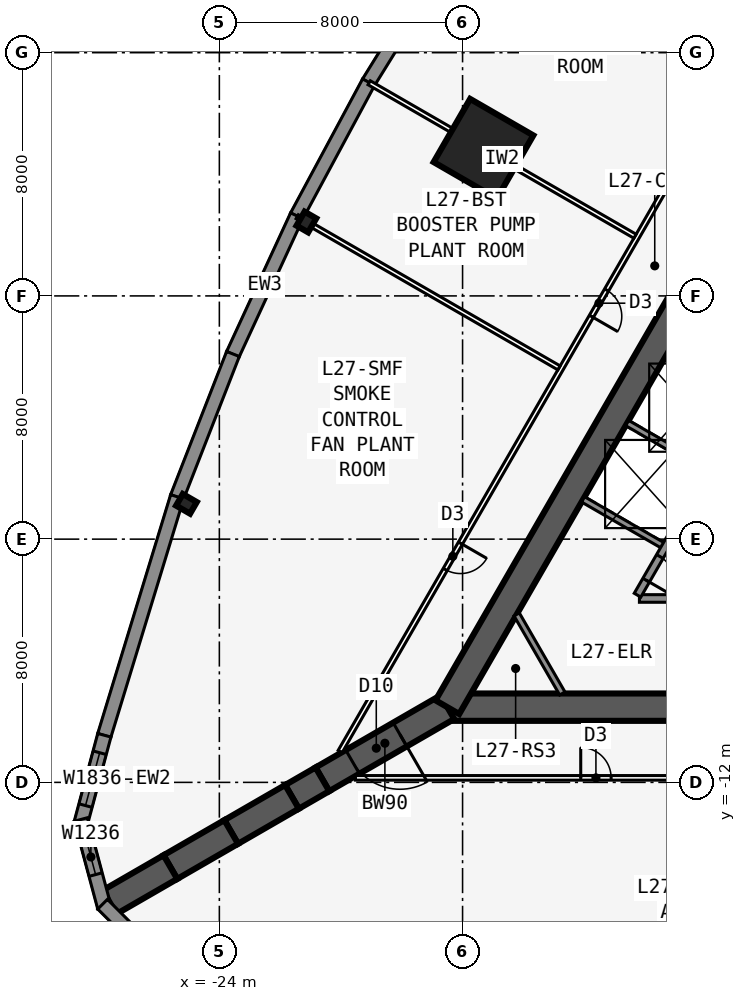
"""IFC4 building model, lengths in metres.
Left out: names, types, materials, properties, quantities, classifications, styles, units other than length and angle.
Written with IfcOpenShell. Run it as: python <this file> out.ifc"""

import sys

from ifc_helpers import new_model, si_unit, direction, frame, frame_2d, origin, origin_2d, place, context, subcontext, project, spatial, polyline, rectangle, i_section, outline, extrude, element, fill, save


model = new_model("IFC4")
c1 = context("Model", 3, precision=1e-05, world=origin(), true_north=direction((0.0, 1.0)))
c2 = subcontext(c1, "Body", "Model", "MODEL_VIEW")
j1 = project(units=[si_unit("LENGTHUNIT", "METRE"), si_unit("PLANEANGLEUNIT", "RADIAN")], contexts=[c1])
p1 = place(None, origin())
s1 = spatial("IfcSite", under=j1, at=p1, CompositionType="ELEMENT")
p2 = place(p1, origin())
s2 = spatial("IfcBuilding", under=s1, at=p2, CompositionType="ELEMENT")
p3 = place(p2, frame((0.0, 0.0, 103.3)))
s3 = spatial("IfcBuildingStorey", under=s2, at=p3, CompositionType="ELEMENT", Elevation=103.3)
p4 = place(p3, frame((-16.5, -9.526, 0.0), z_axis=(0.0, 0.0, 1.0), x_axis=(1.0, 0.0, 0.0)))
e1 = element("IfcWall", 1, at=p4, inside=s3, PredefinedType="SHEAR", context=c2, shape_type="SweptSolid", body=[
    extrude(rectangle(XDim=33.0, YDim=0.9, at=frame_2d((16.5, 0.0))), origin(), (0.0, 0.0, 1.0), 6.4),
])
p5 = place(p4, frame((14.05, 0.0, 0.0)))
e2 = element("IfcOpeningElement", 2, at=p5, cuts=e1, PredefinedType="OPENING", context=c2, shape_type="SweptSolid", body=[
    extrude(rectangle(XDim=1.8, YDim=2.13, at=frame_2d((0.9, 1.065))), frame((0.0, 0.46, 0.0), z_axis=(0.0, -1.0, 0.0), x_axis=(1.0, 0.0, 0.0)), (0.0, 0.0, 1.0), 0.92),
])
p6 = place(p3, frame((-10.183, -5.951, 0.0), z_axis=(0.0, 0.0, 1.0), x_axis=(1.0, 0.0, 0.0)))
e3 = element("IfcWall", 3, at=p6, inside=s3, PredefinedType="SOLIDWALL", context=c2, shape_type="SweptSolid", body=[
    extrude(rectangle(XDim=7.633, YDim=0.25, at=frame_2d((3.816, 0.0))), origin(), (0.0, 0.0, 1.0), 6.15),
])
p7 = place(p3, frame((0.0, 19.052, 0.0), z_axis=(0.0, 0.0, 1.0), x_axis=(-0.499999749417, -0.866025548458, 0.0)))
e4 = element("IfcWall", 4, at=p7, inside=s3, PredefinedType="SHEAR", context=c2, shape_type="SweptSolid", body=[
    extrude(rectangle(XDim=33.0, YDim=0.9, at=frame_2d((16.5, 0.0))), origin(), (0.0, 0.0, 1.0), 6.4),
])
p8 = place(p7, frame((14.15, 0.0, 0.0)))
e5 = element("IfcOpeningElement", 5, at=p8, cuts=e4, PredefinedType="OPENING", context=c2, shape_type="SweptSolid", body=[
    extrude(rectangle(XDim=1.8, YDim=2.13, at=frame_2d((0.9, 1.065))), frame((0.0, 0.46, 0.0), z_axis=(0.0, -1.0, 0.0), x_axis=(1.0, 0.0, 0.0)), (0.0, 0.0, 1.0), 0.92),
])
p9 = place(p7, frame((12.6, 0.0, 0.0)))
e6 = element("IfcOpeningElement", 6, at=p9, cuts=e4, PredefinedType="OPENING", context=c2, shape_type="SweptSolid", body=[
    extrude(rectangle(XDim=1.0, YDim=2.13, at=frame_2d((0.5, 1.065))), frame((0.0, 0.46, 0.0), z_axis=(0.0, -1.0, 0.0), x_axis=(1.0, 0.0, 0.0)), (0.0, 0.0, 1.0), 0.92),
])
p10 = place(p3, frame((-4.929, 3.365, 0.0), z_axis=(0.0, 0.0, 1.0), x_axis=(-0.499991433582, -0.866030349552, 0.0)))
e7 = element("IfcWall", 7, at=p10, inside=s3, PredefinedType="SOLIDWALL", context=c2, shape_type="SweptSolid", body=[
    extrude(rectangle(XDim=10.633, YDim=0.25, at=frame_2d((5.316, 0.0))), origin(), (0.0, 0.0, 1.0), 6.15),
])
p11 = place(p10, frame((9.164, 0.0, 0.0)))
e8 = element("IfcOpeningElement", 8, at=p11, cuts=e7, PredefinedType="OPENING", context=c2, shape_type="SweptSolid", body=[
    extrude(rectangle(XDim=0.9, YDim=2.13, at=frame_2d((0.45, 1.065))), frame((0.0, 0.135, 0.0), z_axis=(0.0, -1.0, 0.0), x_axis=(1.0, 0.0, 0.0)), (0.0, 0.0, 1.0), 0.27),
])
for number, where, z_axis, x_axis in (
    (9, (-7.879, -1.744, 0.0), (0.0, 0.0, 1.0), (-0.866, 0.5, 0.0)),
    (10, (-9.329, -4.256, 0.0), (0.0, 0.0, 1.0), (-0.866, 0.5, 0.0)),
):
    element("IfcWall", number, at=place(p3, frame(where, z_axis=z_axis, x_axis=x_axis)), inside=s3, PredefinedType="SOLIDWALL", context=c2, shape_type="SweptSolid", body=[
        extrude(rectangle(XDim=3.125, YDim=0.2, at=frame_2d((1.562, 0.0))), origin(), (0.0, 0.0, 1.0), 6.15),
    ])
p12 = place(p3, frame((-16.5, -9.526, 0.0), z_axis=(0.0, 0.0, 1.0), x_axis=(-0.866031398331, -0.499989616998, 0.0)))
e11 = element("IfcWall", 11, at=p12, inside=s3, PredefinedType="SHEAR", context=c2, shape_type="SweptSolid", body=[
    extrude(rectangle(XDim=4.746, YDim=0.9, at=frame_2d((2.373, 0.0))), origin(), (0.0, 0.0, 1.0), 6.4),
])
p13 = place(p12, frame((1.8, 0.0, 0.0)))
e12 = element("IfcOpeningElement", 12, at=p13, cuts=e11, PredefinedType="OPENING", context=c2, shape_type="SweptSolid", body=[
    extrude(rectangle(XDim=1.8, YDim=2.13, at=frame_2d((0.9, 1.065))), frame((0.0, 0.46, 0.0), z_axis=(0.0, -1.0, 0.0), x_axis=(1.0, 0.0, 0.0)), (0.0, 0.0, 1.0), 0.92),
])
p14 = place(p3, frame((-20.61, -11.899, 0.0), z_axis=(0.0, 0.0, 1.0), x_axis=(-0.866009537788, -0.500027479704, 0.0)))
e13 = element("IfcWall", 13, at=p14, inside=s3, PredefinedType="SHEAR", context=c2, shape_type="SweptSolid", body=[
    extrude(rectangle(XDim=1.155, YDim=0.9, at=frame_2d((0.577, 0.0))), origin(), (0.0, 0.0, 1.0), 6.4),
])
for number, where, z_axis, x_axis in (
    (14, (-21.61, -12.477, 0.0), (0.0, 0.0, 1.0), (-0.866, -0.5, 0.0)),
    (15, (-23.61, -13.631, 0.0), (0.0, 0.0, 1.0), (-0.866, -0.5, 0.0)),
    (16, (-25.61, -14.786, 0.0), (0.0, 0.0, 1.0), (-0.866, -0.5, 0.0)),
):
    element("IfcWall", number, at=place(p3, frame(where, z_axis=z_axis, x_axis=x_axis)), inside=s3, PredefinedType="SHEAR", context=c2, shape_type="SweptSolid", body=[
        extrude(rectangle(XDim=2.309, YDim=0.9, at=frame_2d((1.155, 0.0))), origin(), (0.0, 0.0, 1.0), 6.4),
    ])
for number, where, z_axis, x_axis in (
    (17, (-21.137, 6.43, 0.0), (0.0, 0.0, 1.0), (-0.866, 0.5, 0.0)),
    (18, (-25.083, -2.839, 0.0), (0.0, 0.0, 1.0), (-0.5, -0.866, 0.0)),
):
    element("IfcColumn", number, at=place(p3, frame(where, z_axis=z_axis, x_axis=x_axis)), inside=s3, PredefinedType="COLUMN", context=c2, shape_type="SweptSolid", body=[
        extrude(i_section(OverallWidth=0.442, OverallDepth=0.531, WebThickness=0.066, FlangeThickness=0.106, at=origin_2d()), origin(), (0.0, 0.0, 1.0), 6.4),
    ])
p15 = place(p3, frame((-15.312, 8.84, 0.0), z_axis=(0.0, 0.0, 1.0), x_axis=(-0.866025403784, 0.5, 0.0)))
e19 = element("IfcColumn", 19, at=p15, inside=s3, PredefinedType="COLUMN", context=c2, shape_type="SweptSolid", body=[
    extrude(rectangle(XDim=2.4, YDim=2.4, at=origin_2d()), origin(), (0.0, 0.0, 1.0), 6.4),
])
p16 = place(p3, frame((-16.466, 15.272, 0.0), z_axis=(0.0, 0.0, 1.0), x_axis=(-0.52611097126, -0.850415925251, 0.0)))
e20 = element("IfcWall", 20, at=p16, inside=s3, PredefinedType="SOLIDWALL", context=c2, shape_type="SweptSolid", body=[
    extrude(outline(polyline([(0.0, 0.0), (5.002, 0.0), (5.002, 6.15), (0.0, 6.15), (0.0, 0.0)]), holes=[polyline([(4.401, 3.075), (4.336, 3.567), (4.146, 4.025), (3.844, 4.418), (3.451, 4.72), (2.993, 4.91), (2.501, 4.975), (2.01, 4.91), (1.551, 4.72), (1.158, 4.418), (0.856, 4.025), (0.666, 3.567), (0.601, 3.075), (0.666, 2.583), (0.856, 2.125), (1.158, 1.731), (1.551, 1.429), (2.01, 1.24), (2.501, 1.175), (2.993, 1.24), (3.451, 1.429), (3.844, 1.731), (4.146, 2.125), (4.336, 2.583), (4.401, 3.075)])]), frame((0.0, 0.225, 0.0), z_axis=(0.0, -1.0, 0.0), x_axis=(1.0, 0.0, 0.0)), (0.0, 0.0, 1.0), 0.45),
])
p17 = place(p3, frame((-19.09, 11.03, 0.0), z_axis=(0.0, 0.0, 1.0), x_axis=(-0.473412820489, -0.880840678782, 0.0)))
e21 = element("IfcWall", 21, at=p17, inside=s3, PredefinedType="SOLIDWALL", context=c2, shape_type="SweptSolid", body=[
    extrude(outline(polyline([(0.0, 0.0), (5.002, 0.0), (5.002, 6.15), (0.0, 6.15), (0.0, 0.0)]), holes=[polyline([(4.401, 3.075), (4.336, 3.567), (4.146, 4.025), (3.845, 4.418), (3.451, 4.72), (2.993, 4.91), (2.501, 4.975), (2.01, 4.91), (1.551, 4.72), (1.158, 4.418), (0.856, 4.025), (0.666, 3.567), (0.601, 3.075), (0.666, 2.583), (0.856, 2.125), (1.158, 1.731), (1.551, 1.429), (2.01, 1.24), (2.501, 1.175), (2.993, 1.24), (3.451, 1.429), (3.845, 1.731), (4.146, 2.125), (4.336, 2.583), (4.401, 3.075)])]), frame((0.0, 0.225, 0.0), z_axis=(0.0, -1.0, 0.0), x_axis=(1.0, 0.0, 0.0)), (0.0, 0.0, 1.0), 0.45),
])
p18 = place(p3, frame((-21.452, 6.636, 0.0), z_axis=(0.0, 0.0, 1.0), x_axis=(-0.419203100754, -0.907892482796, 0.0)))
e22 = element("IfcWall", 22, at=p18, inside=s3, PredefinedType="SOLIDWALL", context=c2, shape_type="SweptSolid", body=[
    extrude(outline(polyline([(0.0, 0.0), (5.021, 0.0), (5.021, 6.15), (0.0, 6.15), (0.0, 0.0)]), holes=[polyline([(4.41, 3.075), (4.346, 3.567), (4.156, 4.025), (3.854, 4.418), (3.46, 4.72), (3.002, 4.91), (2.51, 4.975), (2.019, 4.91), (1.56, 4.72), (1.167, 4.418), (0.865, 4.025), (0.675, 3.567), (0.61, 3.075), (0.675, 2.583), (0.865, 2.125), (1.167, 1.731), (1.56, 1.429), (2.019, 1.24), (2.51, 1.175), (3.002, 1.24), (3.46, 1.429), (3.854, 1.731), (4.156, 2.125), (4.346, 2.583), (4.41, 3.075)])]), frame((0.0, 0.225, 0.0), z_axis=(0.0, -1.0, 0.0), x_axis=(1.0, 0.0, 0.0)), (0.0, 0.0, 1.0), 0.45),
])
p19 = place(p3, frame((-23.552, 2.09, 0.0), z_axis=(0.0, 0.0, 1.0), x_axis=(-0.363971587738, -0.931410051116, 0.0)))
e23 = element("IfcWall", 23, at=p19, inside=s3, PredefinedType="SOLIDWALL", context=c2, shape_type="SweptSolid", body=[
    extrude(outline(polyline([(0.0, 0.0), (5.058, 0.0), (5.058, 6.15), (0.0, 6.15), (0.0, 0.0)]), holes=[polyline([(4.429, 3.075), (4.364, 3.567), (4.174, 4.025), (3.872, 4.418), (3.479, 4.72), (3.021, 4.91), (2.529, 4.975), (2.037, 4.91), (1.579, 4.72), (1.185, 4.418), (0.883, 4.025), (0.694, 3.567), (0.629, 3.075), (0.694, 2.583), (0.883, 2.125), (1.185, 1.731), (1.579, 1.429), (2.037, 1.24), (2.529, 1.175), (3.021, 1.24), (3.479, 1.429), (3.872, 1.731), (4.174, 2.125), (4.364, 2.583), (4.429, 3.075)])]), frame((0.0, 0.225, 0.0), z_axis=(0.0, -1.0, 0.0), x_axis=(1.0, 0.0, 0.0)), (0.0, 0.0, 1.0), 0.45),
])
p20 = place(p3, frame((-25.387, -2.604, 0.0), z_axis=(0.0, 0.0, 1.0), x_axis=(-0.291997961298, -0.956418940945, 0.0)))
e24 = element("IfcWall", 24, at=p20, inside=s3, PredefinedType="SOLIDWALL", context=c2, shape_type="SweptSolid", body=[
    extrude(outline(polyline([(0.0, 0.0), (8.211, 0.0), (8.211, 6.15), (0.0, 6.15), (0.0, 0.0)]), holes=[polyline([(6.556, 3.075), (6.472, 3.709), (6.227, 4.3), (5.838, 4.807), (5.331, 5.197), (4.74, 5.441), (4.106, 5.525), (3.471, 5.441), (2.881, 5.197), (2.373, 4.807), (1.984, 4.3), (1.739, 3.709), (1.656, 3.075), (1.739, 2.441), (1.984, 1.85), (2.373, 1.343), (2.881, 0.953), (3.471, 0.708), (4.106, 0.625), (4.74, 0.708), (5.331, 0.953), (5.838, 1.343), (6.227, 1.85), (6.472, 2.441), (6.556, 3.075)])]), frame((0.0, 0.225, 0.0), z_axis=(0.0, -1.0, 0.0), x_axis=(1.0, 0.0, 0.0)), (0.0, 0.0, 1.0), 0.45),
])
p21 = place(p3, frame((-27.783, -10.45, 0.0), z_axis=(0.0, 0.0, 1.0), x_axis=(-0.258780998834, -0.965936019953, 0.0)))
e25 = element("IfcWall", 25, at=p21, inside=s3, PredefinedType="SOLIDWALL", context=c2, shape_type="SweptSolid", body=[
    extrude(rectangle(XDim=2.989, YDim=0.45, at=frame_2d((1.494, 0.0))), origin(), (0.0, 0.0, 1.0), 6.15),
])
p22 = place(p21, frame((0.594, 0.0, 1.2)))
e26 = element("IfcOpeningElement", 26, at=p22, cuts=e25, PredefinedType="OPENING", context=c2, shape_type="SweptSolid", body=[
    extrude(rectangle(XDim=1.8, YDim=3.6, at=frame_2d((0.9, 1.8))), frame((0.0, 0.235, 0.0), z_axis=(0.0, -1.0, 0.0), x_axis=(1.0, 0.0, 0.0)), (0.0, 0.0, 1.0), 0.47),
])
p23 = place(p3, frame((-28.556, -13.221, 0.0), z_axis=(0.0, 0.0, 1.0), x_axis=(0.258801419081, -0.965930548995, 0.0)))
e27 = element("IfcWall", 27, at=p23, inside=s3, PredefinedType="SOLIDWALL", context=c2, shape_type="SweptSolid", body=[
    extrude(outline(polyline([(2.989, 0.225), (2.929, 0.225), (2.437, 0.093), (2.402, 0.225), (0.0, 0.225), (0.0, -0.225), (2.989, -0.225), (2.989, 0.225)])), origin(), (0.0, 0.0, 1.0), 6.15),
])
p24 = place(p23, frame((0.676, 0.0, 1.2)))
e28 = element("IfcOpeningElement", 28, at=p24, cuts=e27, PredefinedType="OPENING", context=c2, shape_type="SweptSolid", body=[
    extrude(rectangle(XDim=1.2, YDim=3.6, at=frame_2d((0.6, 1.8))), frame((0.0, 0.235, 0.0), z_axis=(0.0, -1.0, 0.0), x_axis=(1.0, 0.0, 0.0)), (0.0, 0.0, 1.0), 0.47),
])
p25 = place(p3, frame((-27.841, -16.007, 0.0), z_axis=(0.0, 0.0, 1.0), x_axis=(0.707025086683, -0.707188466253, 0.0)))
e29 = element("IfcWall", 29, at=p25, inside=s3, PredefinedType="SOLIDWALL", context=c2, shape_type="SweptSolid", body=[
    extrude(outline(polyline([(2.989, 0.225), (0.586, 0.225), (0.551, 0.093), (0.059, 0.225), (0.0, 0.225), (0.0, -0.225), (2.989, -0.225), (2.989, 0.225)])), origin(), (0.0, 0.0, 1.0), 6.15),
])
p26 = place(p25, frame((1.113, 0.0, 1.2)))
e30 = element("IfcOpeningElement", 30, at=p26, cuts=e29, PredefinedType="OPENING", context=c2, shape_type="SweptSolid", body=[
    extrude(rectangle(XDim=1.2, YDim=3.6, at=frame_2d((0.6, 1.8))), frame((0.0, 0.235, 0.0), z_axis=(0.0, -1.0, 0.0), x_axis=(1.0, 0.0, 0.0)), (0.0, 0.0, 1.0), 0.47),
])
p27 = place(p3, frame((-19.527, -11.851, 0.0), z_axis=(0.0, 0.0, 1.0), x_axis=(1.0, 0.0, 0.0)))
e31 = element("IfcWall", 31, at=p27, inside=s3, PredefinedType="PARTITIONING", context=c2, shape_type="SweptSolid", body=[
    extrude(rectangle(XDim=39.054, YDim=0.15, at=frame_2d((19.527, 0.0))), origin(), (0.0, 0.0, 1.0), 6.15),
])
p28 = place(p27, frame((7.414, 0.0, 0.0)))
e32 = element("IfcOpeningElement", 32, at=p28, cuts=e31, PredefinedType="OPENING", context=c2, shape_type="SweptSolid", body=[
    extrude(rectangle(XDim=1.0, YDim=2.13, at=frame_2d((0.5, 1.065))), frame((0.0, 0.085, 0.0), z_axis=(0.0, -1.0, 0.0), x_axis=(1.0, 0.0, 0.0)), (0.0, 0.0, 1.0), 0.17),
])
p29 = place(p27, frame((17.027, 0.0, 0.0)))
e33 = element("IfcOpeningElement", 33, at=p29, cuts=e31, PredefinedType="OPENING", context=c2, shape_type="SweptSolid", body=[
    extrude(rectangle(XDim=1.0, YDim=2.13, at=frame_2d((0.5, 1.065))), frame((0.0, 0.085, 0.0), z_axis=(0.0, -1.0, 0.0), x_axis=(1.0, 0.0, 0.0)), (0.0, 0.0, 1.0), 0.17),
])
p30 = place(p27, frame((28.64, 0.0, 0.0)))
e34 = element("IfcOpeningElement", 34, at=p30, cuts=e31, PredefinedType="OPENING", context=c2, shape_type="SweptSolid", body=[
    extrude(rectangle(XDim=1.0, YDim=2.13, at=frame_2d((0.5, 1.065))), frame((0.0, 0.085, 0.0), z_axis=(0.0, -1.0, 0.0), x_axis=(1.0, 0.0, 0.0)), (0.0, 0.0, 1.0), 0.17),
])
p31 = place(p3, frame((-0.5, 22.836, 0.0), z_axis=(0.0, 0.0, 1.0), x_axis=(-0.500001677587, -0.866024435227, 0.0)))
e35 = element("IfcWall", 35, at=p31, inside=s3, PredefinedType="PARTITIONING", context=c2, shape_type="SweptSolid", body=[
    extrude(rectangle(XDim=39.054, YDim=0.15, at=frame_2d((19.527, 0.0))), origin(), (0.0, 0.0, 1.0), 6.15),
])
p32 = place(p31, frame((9.414, 0.0, 0.0)))
e36 = element("IfcOpeningElement", 36, at=p32, cuts=e35, PredefinedType="OPENING", context=c2, shape_type="SweptSolid", body=[
    extrude(rectangle(XDim=1.0, YDim=2.13, at=frame_2d((0.5, 1.065))), frame((0.0, 0.085, 0.0), z_axis=(0.0, -1.0, 0.0), x_axis=(1.0, 0.0, 0.0)), (0.0, 0.0, 1.0), 0.17),
])
p33 = place(p31, frame((21.527, 0.0, 0.0)))
e37 = element("IfcOpeningElement", 37, at=p33, cuts=e35, PredefinedType="OPENING", context=c2, shape_type="SweptSolid", body=[
    extrude(rectangle(XDim=1.0, YDim=2.13, at=frame_2d((0.5, 1.065))), frame((0.0, 0.085, 0.0), z_axis=(0.0, -1.0, 0.0), x_axis=(1.0, 0.0, 0.0)), (0.0, 0.0, 1.0), 0.17),
])
p34 = place(p31, frame((31.14, 0.0, 0.0)))
e38 = element("IfcOpeningElement", 38, at=p34, cuts=e35, PredefinedType="OPENING", context=c2, shape_type="SweptSolid", body=[
    extrude(rectangle(XDim=1.0, YDim=2.13, at=frame_2d((0.5, 1.065))), frame((0.0, 0.085, 0.0), z_axis=(0.0, -1.0, 0.0), x_axis=(1.0, 0.0, 0.0)), (0.0, 0.0, 1.0), 0.17),
])
p35 = place(p3, frame((-10.329, 5.963, 0.0), z_axis=(0.0, 0.0, 1.0), x_axis=(-0.866021688545, 0.500006434927, 0.0)))
e39 = element("IfcWall", 39, at=p35, inside=s3, PredefinedType="PARTITIONING", context=c2, shape_type="SweptSolid", body=[
    extrude(rectangle(XDim=10.096, YDim=0.15, at=frame_2d((5.048, 0.0))), origin(), (0.0, 0.0, 1.0), 5.109),
])
p36 = place(p3, frame((-12.829, 1.633, 0.0), z_axis=(0.0, 0.0, 1.0), x_axis=(-0.866026934769, 0.499997348248, 0.0)))
e40 = element("IfcWall", 40, at=p36, inside=s3, PredefinedType="PARTITIONING", context=c2, shape_type="SweptSolid", body=[
    extrude(rectangle(XDim=9.943, YDim=0.15, at=frame_2d((4.971, 0.0))), origin(), (0.0, 0.0, 1.0), 4.75),
])
p37 = place(p3, frame((-12.719, -9.076, 0.0), z_axis=(0.0, 0.0, 1.0), x_axis=(-0.499952404951, 0.866052881055, 0.0)))
e41 = element("IfcWall", 41, at=p37, inside=s3, PredefinedType="SOLIDWALL", context=c2, shape_type="SweptSolid", body=[
    extrude(rectangle(XDim=3.002, YDim=0.2, at=frame_2d((1.501, 0.0))), origin(), (0.0, 0.0, 1.0), 6.15),
])
p38 = place(p22, origin())
e42 = element("IfcWindow", 42, at=p38, inside=s3, PartitioningType="SINGLE_PANEL", PredefinedType="WINDOW", context=c2, shape_type="SweptSolid", body=[
    extrude(rectangle(XDim=1.8, YDim=3.6, at=frame_2d((0.9, 1.8))), frame((0.0, 0.03, 0.0), z_axis=(0.0, -1.0, 0.0), x_axis=(1.0, 0.0, 0.0)), (0.0, 0.0, 1.0), 0.06),
])
fill(e26, e42)
p39 = place(p24, origin())
e43 = element("IfcWindow", 43, at=p39, inside=s3, PartitioningType="SINGLE_PANEL", PredefinedType="WINDOW", context=c2, shape_type="SweptSolid", body=[
    extrude(rectangle(XDim=1.2, YDim=3.6, at=frame_2d((0.6, 1.8))), frame((0.0, 0.03, 0.0), z_axis=(0.0, -1.0, 0.0), x_axis=(1.0, 0.0, 0.0)), (0.0, 0.0, 1.0), 0.06),
])
fill(e28, e43)
p40 = place(p28, origin())
e44 = element("IfcDoor", 44, at=p40, inside=s3, OperationType="SINGLE_SWING_LEFT", PredefinedType="DOOR", context=c2, shape_type="SweptSolid", body=[
    extrude(rectangle(XDim=1.0, YDim=2.13, at=frame_2d((0.5, 1.065))), frame((0.0, 0.025, 0.0), z_axis=(0.0, -1.0, 0.0), x_axis=(1.0, 0.0, 0.0)), (0.0, 0.0, 1.0), 0.05),
])
fill(e32, e44)
p41 = place(p33, origin())
e45 = element("IfcDoor", 45, at=p41, inside=s3, OperationType="SINGLE_SWING_RIGHT", PredefinedType="DOOR", context=c2, shape_type="SweptSolid", body=[
    extrude(rectangle(XDim=1.0, YDim=2.13, at=frame_2d((0.5, 1.065))), frame((0.0, 0.025, 0.0), z_axis=(0.0, -1.0, 0.0), x_axis=(1.0, 0.0, 0.0)), (0.0, 0.0, 1.0), 0.05),
])
fill(e37, e45)
p42 = place(p34, origin())
e46 = element("IfcDoor", 46, at=p42, inside=s3, OperationType="SINGLE_SWING_LEFT", PredefinedType="DOOR", context=c2, shape_type="SweptSolid", body=[
    extrude(rectangle(XDim=1.0, YDim=2.13, at=frame_2d((0.5, 1.065))), frame((0.0, 0.025, 0.0), z_axis=(0.0, -1.0, 0.0), x_axis=(1.0, 0.0, 0.0)), (0.0, 0.0, 1.0), 0.05),
])
fill(e38, e46)
p43 = place(p13, origin())
e47 = element("IfcDoor", 47, at=p43, inside=s3, OperationType="DOUBLE_DOOR_DOUBLE_SWING", PredefinedType="DOOR", context=c2, shape_type="SweptSolid", body=[
    extrude(rectangle(XDim=1.8, YDim=2.13, at=frame_2d((0.9, 1.065))), frame((0.0, 0.025, 0.0), z_axis=(0.0, -1.0, 0.0), x_axis=(1.0, 0.0, 0.0)), (0.0, 0.0, 1.0), 0.05),
])
fill(e12, e47)
p44 = place(p11, origin())
e48 = element("IfcDoor", 48, at=p44, inside=s3, OperationType="SINGLE_SWING_RIGHT", PredefinedType="DOOR", context=c2, shape_type="SweptSolid", body=[
    extrude(rectangle(XDim=0.9, YDim=2.13, at=frame_2d((0.45, 1.065))), frame((0.0, 0.025, 0.0), z_axis=(0.0, -1.0, 0.0), x_axis=(1.0, 0.0, 0.0)), (0.0, 0.0, 1.0), 0.05),
])
fill(e8, e48)
save(model, sys.argv[1])
